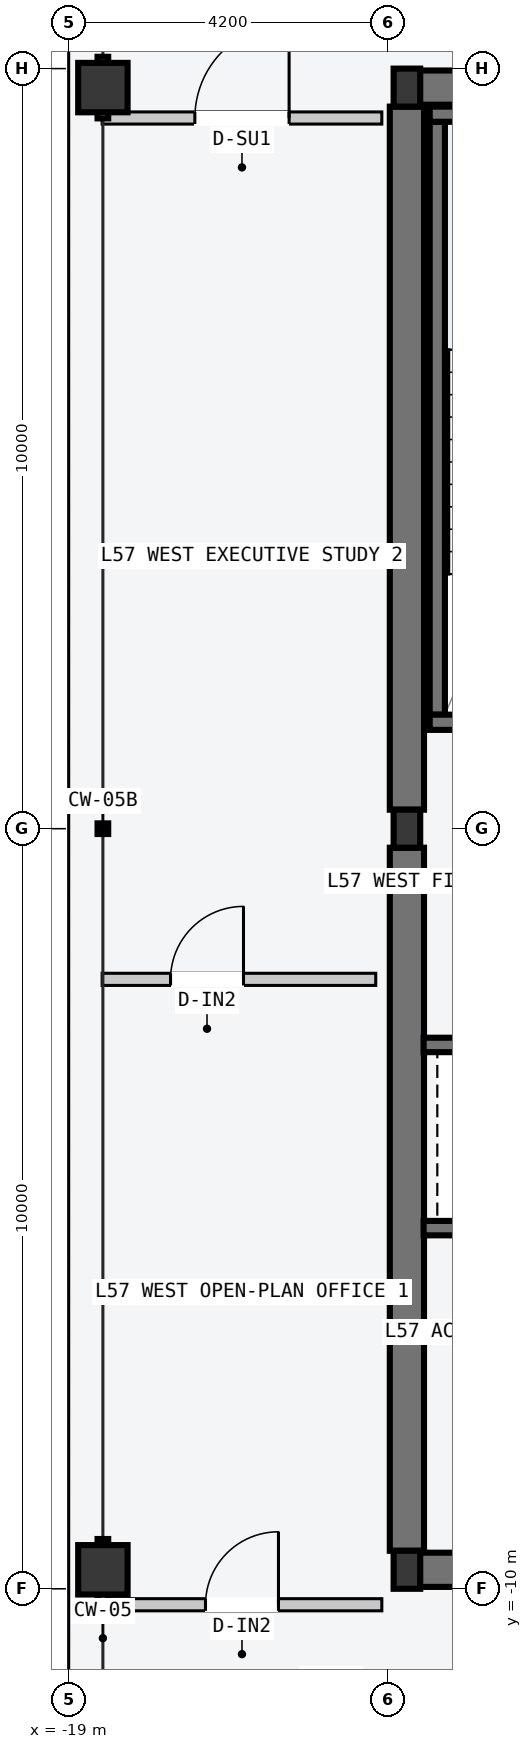
"""IFC4 building model, lengths in metres.
Left out: names, types, materials, properties, quantities, classifications, styles, units other than length and angle.
Written with IfcOpenShell. Run it as: python <this file> out.ifc"""

import sys

from ifc_helpers import new_model, si_unit, direction, frame, frame_2d, origin, origin_2d, place, context, subcontext, project, spatial, rectangle, hollow_rectangle, i_section, extrude, element, fill, save


model = new_model("IFC4")
c1 = context("Model", 3, precision=1e-05, world=origin(), true_north=direction((0.0, 1.0)))
c2 = subcontext(c1, "Body", "Model", "MODEL_VIEW")
j1 = project(units=[si_unit("LENGTHUNIT", "METRE"), si_unit("PLANEANGLEUNIT", "RADIAN")], contexts=[c1])
p1 = place(None, origin())
s1 = spatial("IfcSite", under=j1, at=p1, CompositionType="ELEMENT")
p2 = place(p1, origin())
s2 = spatial("IfcBuilding", under=s1, at=p2, CompositionType="ELEMENT")
p3 = place(p2, frame((0.0, 0.0, 218.4)))
s3 = spatial("IfcBuildingStorey", under=s2, at=p3, CompositionType="ELEMENT", Elevation=218.4)
for number, where, z_axis, x_axis in (
    (1, (-14.53, -9.75, -0.2), (0.0, 0.0, 1.0), (1.0, 0.0, 0.0)),
    (2, (-14.53, 9.75, -0.2), (0.0, 0.0, 1.0), (1.0, 0.0, 0.0)),
):
    element("IfcWall", number, at=place(p3, frame(where, z_axis=z_axis, x_axis=x_axis)), inside=s3, PredefinedType="SHEAR", context=c2, shape_type="SweptSolid", body=[
        extrude(rectangle(XDim=6.46, YDim=0.45, at=frame_2d((3.23, 0.0))), origin(), (0.0, 0.0, 1.0), 3.6),
    ])
for number, where, z_axis, x_axis in (
    (3, (-14.55, -9.5, -0.2), (0.0, 0.0, 1.0), (0.0, 1.0, 0.0)),
    (4, (-14.55, 0.25, -0.2), (0.0, 0.0, 1.0), (0.0, 1.0, 0.0)),
):
    element("IfcWall", number, at=place(p3, frame(where, z_axis=z_axis, x_axis=x_axis)), inside=s3, PredefinedType="SHEAR", context=c2, shape_type="SweptSolid", body=[
        extrude(rectangle(XDim=9.25, YDim=0.45, at=frame_2d((4.625, 0.0))), origin(), (0.0, 0.0, 1.0), 3.6),
    ])
p4 = place(p3, frame((-14.15, 1.5, -0.2), z_axis=(0.0, 0.0, 1.0), x_axis=(0.0, 1.0, 0.0)))
e5 = element("IfcWall", 5, at=p4, inside=s3, PredefinedType="SOLIDWALL", context=c2, shape_type="SweptSolid", body=[
    extrude(rectangle(XDim=7.8, YDim=0.2, at=frame_2d((3.9, 0.0))), origin(), (0.0, 0.0, 1.0), 3.6),
])
p5 = place(p3, frame((-14.25, 1.4, -0.2), z_axis=(0.0, 0.0, 1.0), x_axis=(1.0, 0.0, 0.0)))
e6 = element("IfcWall", 6, at=p5, inside=s3, PredefinedType="SOLIDWALL", context=c2, shape_type="SweptSolid", body=[
    extrude(rectangle(XDim=3.72, YDim=0.2, at=frame_2d((1.86, 0.0))), origin(), (0.0, 0.0, 1.0), 3.6),
])
p6 = place(p5, frame((1.5, 0.0, 0.2)))
e7 = element("IfcOpeningElement", 7, at=p6, cuts=e6, PredefinedType="OPENING", context=c2, shape_type="SweptSolid", body=[
    extrude(rectangle(XDim=1.12, YDim=2.18, at=frame_2d((0.56, 1.09))), frame((0.0, 0.11, 0.0), z_axis=(0.0, -1.0, 0.0), x_axis=(1.0, 0.0, 0.0)), (0.0, 0.0, 1.0), 0.22),
])
p7 = place(p3, frame((-14.25, 9.4, -0.2), z_axis=(0.0, 0.0, 1.0), x_axis=(1.0, 0.0, 0.0)))
e8 = element("IfcWall", 8, at=p7, inside=s3, PredefinedType="SOLIDWALL", context=c2, shape_type="SweptSolid", body=[
    extrude(rectangle(XDim=3.72, YDim=0.2, at=frame_2d((1.86, 0.0))), origin(), (0.0, 0.0, 1.0), 3.6),
])
for number, where, z_axis, x_axis in (
    (9, (-14.55, -9.75, 0.0), (0.0, 0.0, 1.0), (1.0, 0.0, 0.0)),
    (10, (-14.55, 0.0, 0.0), (0.0, 0.0, 1.0), (1.0, 0.0, 0.0)),
    (11, (-14.55, 9.75, 0.0), (0.0, 0.0, 1.0), (1.0, 0.0, 0.0)),
):
    element("IfcColumn", number, at=place(p3, frame(where, z_axis=z_axis, x_axis=x_axis)), inside=s3, PredefinedType="COLUMN", context=c2, shape_type="SweptSolid", body=[
        extrude(i_section(OverallWidth=0.35, OverallDepth=0.5, WebThickness=0.02, FlangeThickness=0.032, at=origin_2d()), origin(), (0.0, 0.0, 1.0), 3.6),
    ])
for number, where, z_axis, x_axis in (
    (12, (-18.55, -9.75, 0.0), (0.0, 0.0, 1.0), (0.0, 1.0, 0.0)),
    (13, (-18.55, 9.75, 0.0), (0.0, 0.0, 1.0), (0.0, 1.0, 0.0)),
):
    element("IfcColumn", number, at=place(p3, frame(where, z_axis=z_axis, x_axis=x_axis)), inside=s3, PredefinedType="COLUMN", context=c2, shape_type="SweptSolid", body=[
        extrude(hollow_rectangle(XDim=0.65, YDim=0.65, WallThickness=0.028, at=origin_2d()), origin(), (0.0, 0.0, 1.0), 3.6),
    ])
p8 = place(p3, frame((-14.33, -2.845, -0.2), z_axis=(0.0, 0.0, 1.0), x_axis=(1.0, 0.0, 0.0)))
e14 = element("IfcWall", 14, at=p8, inside=s3, PredefinedType="SOLIDWALL", context=c2, shape_type="SweptSolid", body=[
    extrude(rectangle(XDim=2.68, YDim=0.19, at=frame_2d((1.34, 0.0))), origin(), (0.0, 0.0, 1.0), 3.6),
])
p9 = place(p8, frame((0.83, 0.0, 0.2)))
e15 = element("IfcOpeningElement", 15, at=p9, cuts=e14, PredefinedType="OPENING", context=c2, shape_type="SweptSolid", body=[
    extrude(rectangle(XDim=1.2, YDim=2.2, at=frame_2d((0.6, 1.1))), frame((0.0, 0.105, 0.0), z_axis=(0.0, -1.0, 0.0), x_axis=(1.0, 0.0, 0.0)), (0.0, 0.0, 1.0), 0.21),
])
p10 = place(p3, frame((-14.33, -5.255, -0.2), z_axis=(0.0, 0.0, 1.0), x_axis=(1.0, 0.0, 0.0)))
e16 = element("IfcWall", 16, at=p10, inside=s3, PredefinedType="SOLIDWALL", context=c2, shape_type="SweptSolid", body=[
    extrude(rectangle(XDim=2.68, YDim=0.19, at=frame_2d((1.34, 0.0))), origin(), (0.0, 0.0, 1.0), 3.6),
])
p11 = place(p3, frame((-18.56, 9.35, 0.0), z_axis=(0.0, 0.0, 1.0), x_axis=(1.0, 0.0, 0.0)))
e17 = element("IfcWall", 17, at=p11, inside=s3, PredefinedType="PARTITIONING", context=c2, shape_type="SweptSolid", body=[
    extrude(rectangle(XDim=3.68, YDim=0.16, at=frame_2d((1.84, 0.0))), origin(), (0.0, 0.0, 1.0), 3.4),
])
p12 = place(p11, frame((1.22, 0.0, 0.0)))
e18 = element("IfcOpeningElement", 18, at=p12, cuts=e17, PredefinedType="OPENING", context=c2, shape_type="SweptSolid", body=[
    extrude(rectangle(XDim=1.24, YDim=2.24, at=frame_2d((0.62, 1.12))), frame((0.0, 0.09, 0.0), z_axis=(0.0, -1.0, 0.0), x_axis=(1.0, 0.0, 0.0)), (0.0, 0.0, 1.0), 0.18),
])
p13 = place(p3, frame((-18.56, -10.21, 0.0), z_axis=(0.0, 0.0, 1.0), x_axis=(1.0, 0.0, 0.0)))
e19 = element("IfcWall", 19, at=p13, inside=s3, PredefinedType="PARTITIONING", context=c2, shape_type="SweptSolid", body=[
    extrude(rectangle(XDim=3.68, YDim=0.16, at=frame_2d((1.84, 0.0))), origin(), (0.0, 0.0, 1.0), 3.4),
])
p14 = place(p13, frame((1.36, 0.0, 0.0)))
e20 = element("IfcOpeningElement", 20, at=p14, cuts=e19, PredefinedType="OPENING", context=c2, shape_type="SweptSolid", body=[
    extrude(rectangle(XDim=0.96, YDim=2.18, at=frame_2d((0.48, 1.09))), frame((0.0, 0.09, 0.0), z_axis=(0.0, -1.0, 0.0), x_axis=(1.0, 0.0, 0.0)), (0.0, 0.0, 1.0), 0.18),
])
p15 = place(p3, frame((-18.56, -1.982, 0.0), z_axis=(0.0, 0.0, 1.0), x_axis=(1.0, 0.0, 0.0)))
e21 = element("IfcWall", 21, at=p15, inside=s3, PredefinedType="PARTITIONING", context=c2, shape_type="SweptSolid", body=[
    extrude(rectangle(XDim=3.6, YDim=0.16, at=frame_2d((1.8, 0.0))), origin(), (0.0, 0.0, 1.0), 3.4),
])
p16 = place(p15, frame((0.9, 0.0, 0.0)))
e22 = element("IfcOpeningElement", 22, at=p16, cuts=e21, PredefinedType="OPENING", context=c2, shape_type="SweptSolid", body=[
    extrude(rectangle(XDim=0.96, YDim=2.18, at=frame_2d((0.48, 1.09))), frame((0.0, 0.09, 0.0), z_axis=(0.0, -1.0, 0.0), x_axis=(1.0, 0.0, 0.0)), (0.0, 0.0, 1.0), 0.18),
])
p17 = place(p12, origin())
e23 = element("IfcDoor", 23, at=p17, inside=s3, OperationType="SINGLE_SWING_RIGHT", PredefinedType="DOOR", context=c2, shape_type="SweptSolid", body=[
    extrude(rectangle(XDim=1.24, YDim=2.24, at=frame_2d((0.62, 1.12))), frame((0.0, 0.025, 0.0), z_axis=(0.0, -1.0, 0.0), x_axis=(1.0, 0.0, 0.0)), (0.0, 0.0, 1.0), 0.05),
])
fill(e18, e23)
p18 = place(p14, origin())
e24 = element("IfcDoor", 24, at=p18, inside=s3, OperationType="SINGLE_SWING_RIGHT", PredefinedType="DOOR", context=c2, shape_type="SweptSolid", body=[
    extrude(rectangle(XDim=0.96, YDim=2.18, at=frame_2d((0.48, 1.09))), frame((0.0, 0.025, 0.0), z_axis=(0.0, -1.0, 0.0), x_axis=(1.0, 0.0, 0.0)), (0.0, 0.0, 1.0), 0.05),
])
fill(e20, e24)
p19 = place(p16, origin())
e25 = element("IfcDoor", 25, at=p19, inside=s3, OperationType="SINGLE_SWING_RIGHT", PredefinedType="DOOR", context=c2, shape_type="SweptSolid", body=[
    extrude(rectangle(XDim=0.96, YDim=2.18, at=frame_2d((0.48, 1.09))), frame((0.0, 0.025, 0.0), z_axis=(0.0, -1.0, 0.0), x_axis=(1.0, 0.0, 0.0)), (0.0, 0.0, 1.0), 0.05),
])
fill(e22, e25)
save(model, sys.argv[1])
